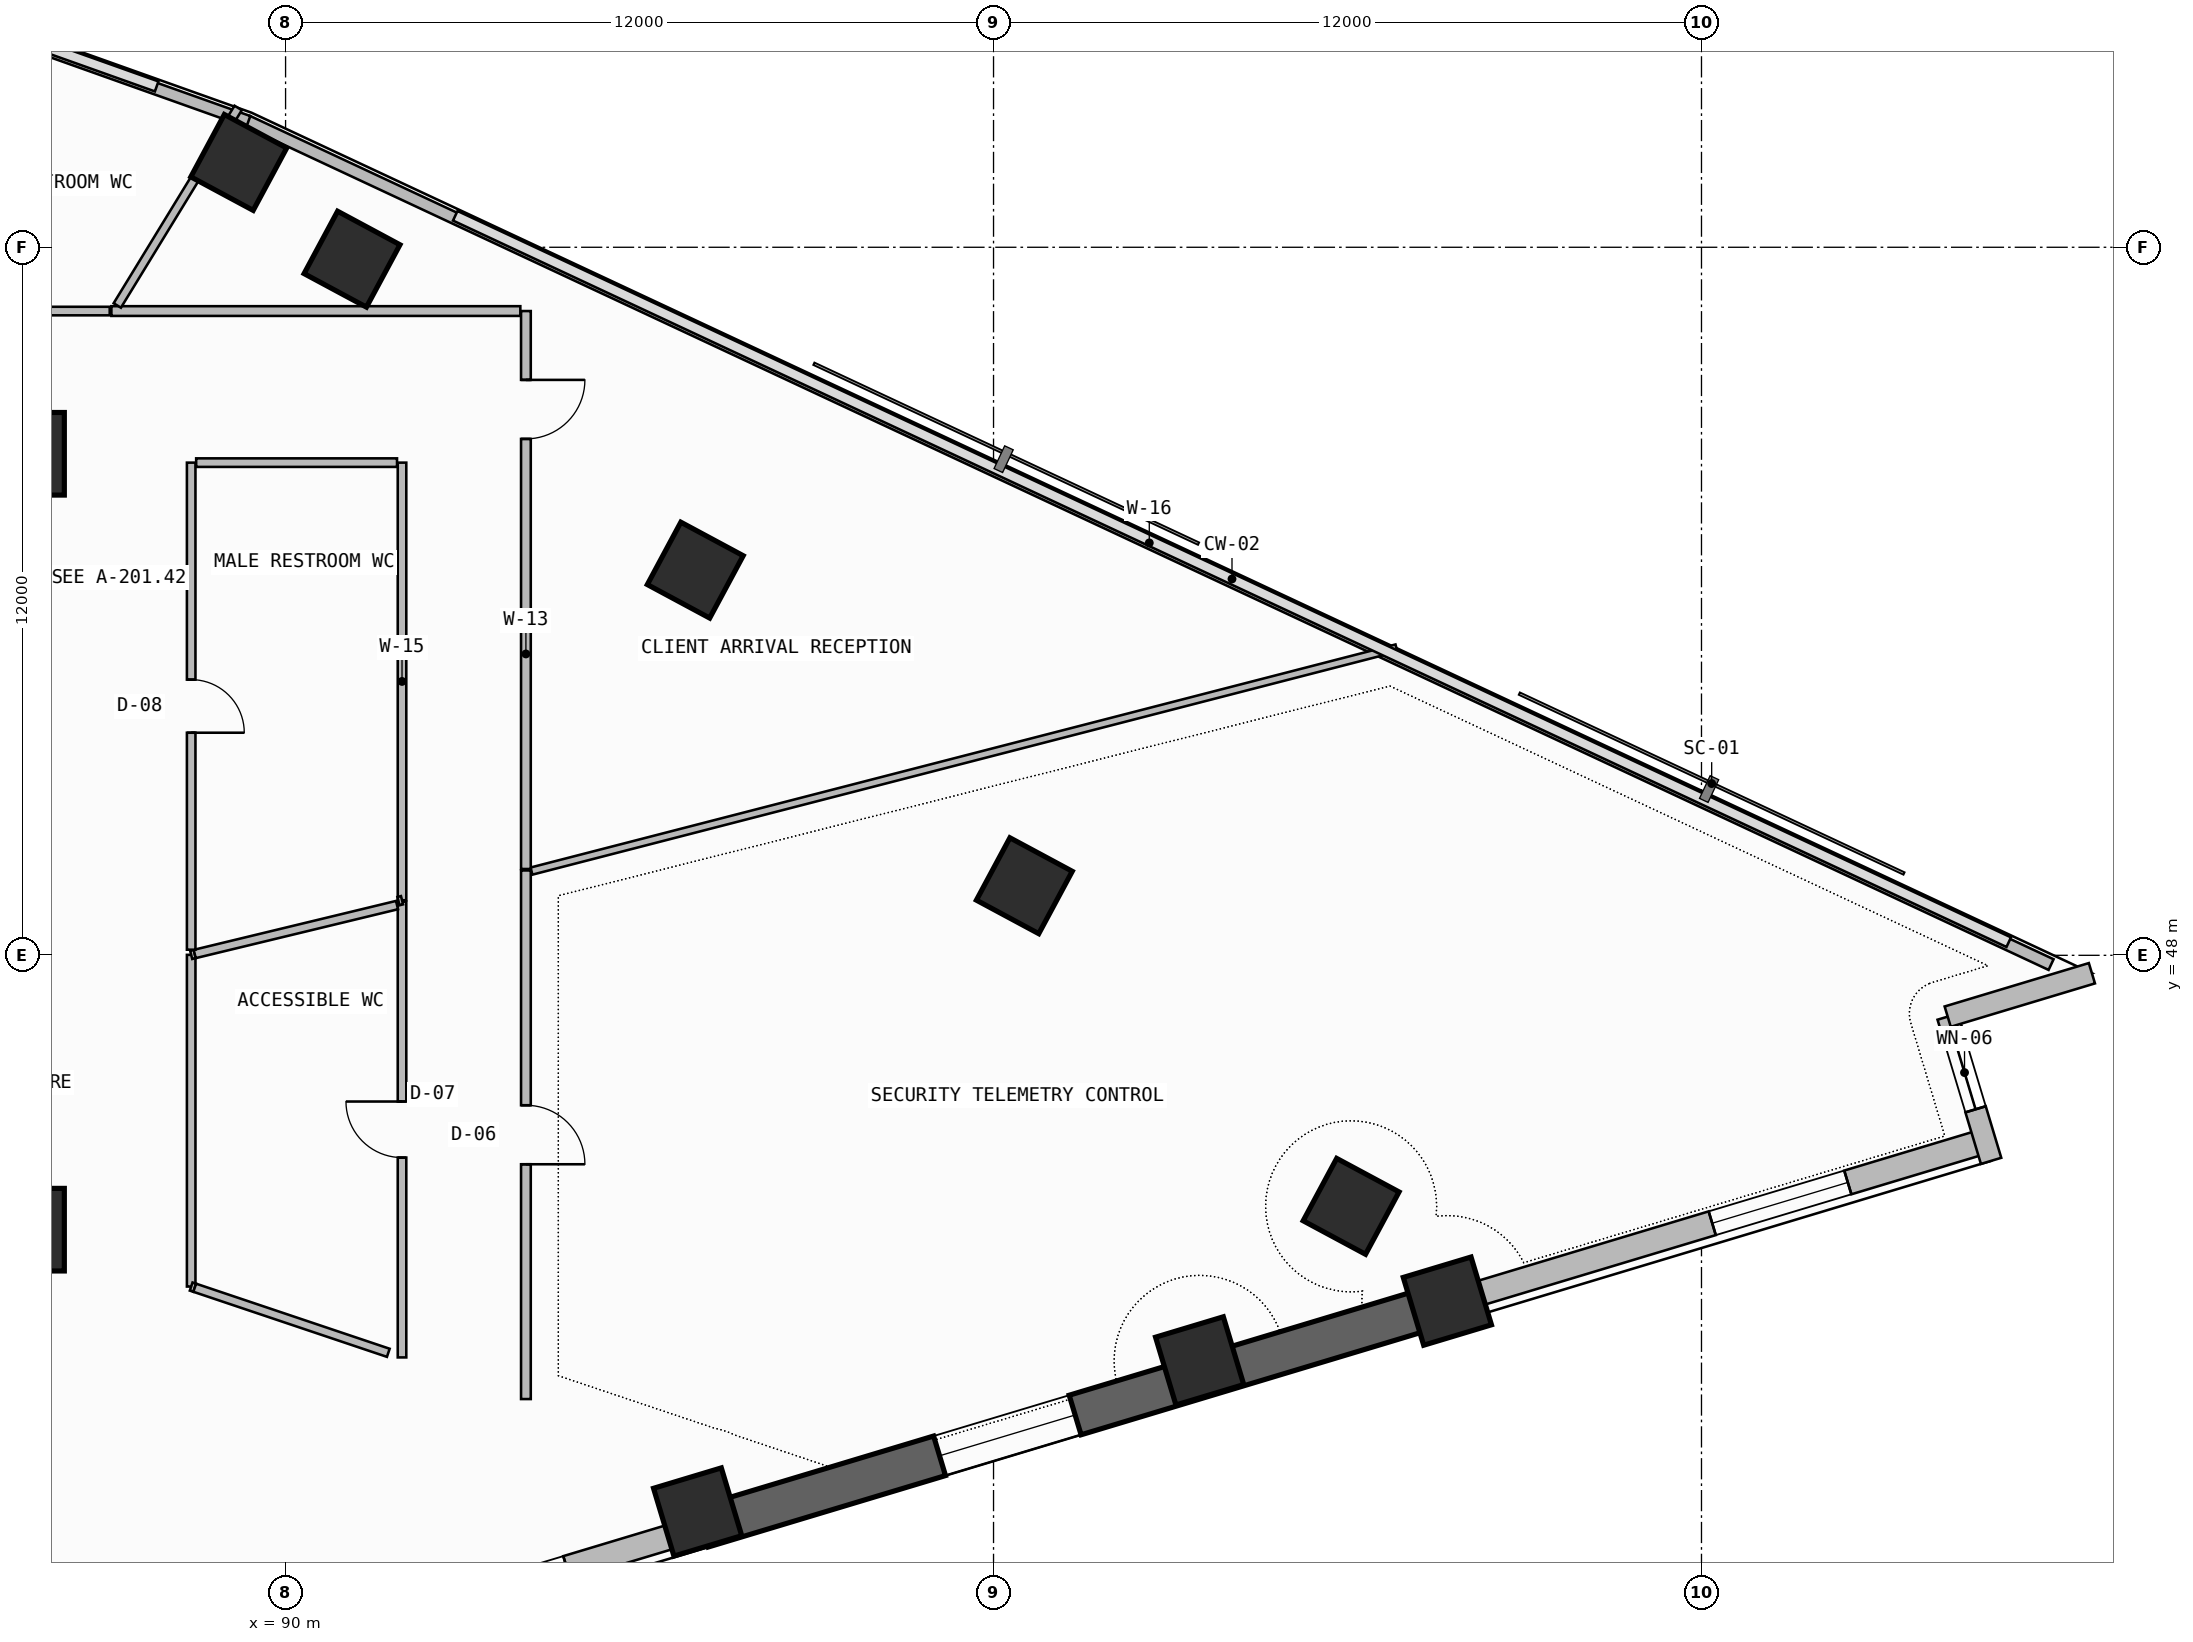
"""IFC4 building model, lengths in metres.
Left out: names, types, materials, properties, quantities, classifications, styles, units other than length and angle.
Written with IfcOpenShell. Run it as: python <this file> out.ifc"""

import sys

from ifc_helpers import new_model, si_unit, direction, frame, frame_2d, origin, origin_2d, place, context, subcontext, project, spatial, rectangle, extrude, element, fill, save


model = new_model("IFC4")
c1 = context("Model", 3, precision=1e-05, world=origin(), true_north=direction((0.0, 1.0)))
c2 = subcontext(c1, "Body", "Model", "MODEL_VIEW")
j1 = project(units=[si_unit("LENGTHUNIT", "METRE"), si_unit("PLANEANGLEUNIT", "RADIAN")], contexts=[c1])
p1 = place(None, origin())
s1 = spatial("IfcSite", under=j1, at=p1, CompositionType="ELEMENT")
p2 = place(p1, origin())
s2 = spatial("IfcBuilding", under=s1, at=p2, CompositionType="ELEMENT")
p3 = place(p2, frame((0.0, 0.0, 150.3)))
s3 = spatial("IfcBuildingStorey", under=s2, at=p3, CompositionType="ELEMENT", Elevation=150.3)
for number, where, z_axis, x_axis in (
    (1, (85.55, 43.35, 0.0), (0.0, 0.0, 1.0), (1.0, 0.0, 0.0)),
    (2, (85.55, 56.5, 0.0), (0.0, 0.0, 1.0), (1.0, 0.0, 0.0)),
):
    element("IfcColumn", number, at=place(p3, frame(where, z_axis=z_axis, x_axis=x_axis)), inside=s3, PredefinedType="COLUMN", context=c2, shape_type="SweptSolid", body=[
        extrude(rectangle(XDim=1.4, YDim=1.4, at=origin_2d()), origin(), (0.0, 0.0, 1.0), 3.6),
    ])
for number, where, z_axis, x_axis in (
    (3, (96.985, 38.565, 0.0), (0.0, 0.0, 1.0), (0.958, 0.288, 0.0)),
    (4, (105.494, 41.126, 0.0), (0.0, 0.0, 1.0), (0.958, 0.288, 0.0)),
    (5, (109.693, 42.139, 0.0), (0.0, 0.0, 1.0), (0.958, 0.288, 0.0)),
    (6, (108.061, 43.746, 0.0), (0.0, 0.0, 1.0), (0.473, 0.881, 0.0)),
    (7, (102.522, 49.179, 0.0), (0.0, 0.0, 1.0), (0.473, 0.881, 0.0)),
    (8, (96.944, 54.528, 0.0), (0.0, 0.0, 1.0), (0.473, 0.881, 0.0)),
    (9, (91.126, 59.798, 0.0), (0.0, 0.0, 1.0), (0.473, 0.881, 0.0)),
    (10, (89.207, 61.438, 0.0), (0.0, 0.0, 1.0), (0.473, 0.881, 0.0)),
):
    element("IfcColumn", number, at=place(p3, frame(where, z_axis=z_axis, x_axis=x_axis)), inside=s3, PredefinedType="COLUMN", context=c2, shape_type="SweptSolid", body=[
        extrude(rectangle(XDim=1.2, YDim=1.2, at=origin_2d()), origin(), (0.0, 0.0, 1.0), 3.6),
    ])
p4 = place(p3, frame((86.1, 35.007, 0.0), z_axis=(0.0, 0.0, 1.0), x_axis=(0.957569401796, 0.288202777129, 0.0)))
e11 = element("IfcWall", 11, at=p4, inside=s3, PredefinedType="SOLIDWALL", context=c2, shape_type="SweptSolid", body=[
    extrude(rectangle(XDim=11.448, YDim=0.42, at=frame_2d((5.724, 0.0))), origin(), (0.0, 0.0, 1.0), 2.325),
])
p5 = place(p4, frame((6.652, 0.0, 1.2)))
e12 = element("IfcOpeningElement", 12, at=p5, cuts=e11, PredefinedType="OPENING", context=c2, shape_type="SweptSolid", body=[
    extrude(rectangle(XDim=2.4, YDim=0.9, at=frame_2d((1.2, 0.45))), frame((0.0, 0.22, 0.0), z_axis=(0.0, -1.0, 0.0), x_axis=(1.0, 0.0, 0.0)), (0.0, 0.0, 1.0), 0.44),
])
p6 = place(p3, frame((97.062, 38.307, -0.26), z_axis=(0.0, 0.0, 1.0), x_axis=(0.957569832102, 0.288201347408, 0.0)))
e13 = element("IfcWall", 13, at=p6, inside=s3, PredefinedType="SHEAR", context=c2, shape_type="SweptSolid", body=[
    extrude(rectangle(XDim=13.199, YDim=0.7, at=frame_2d((6.6, 0.0))), origin(), (0.0, 0.0, 1.0), 3.6),
])
p7 = place(p6, frame((4.201, 0.0, 1.2)))
e14 = element("IfcOpeningElement", 14, at=p7, cuts=e13, PredefinedType="OPENING", context=c2, shape_type="SweptSolid", body=[
    extrude(rectangle(XDim=2.4, YDim=0.9, at=frame_2d((1.2, 0.45))), frame((0.0, 0.36, 0.0), z_axis=(0.0, -1.0, 0.0), x_axis=(1.0, 0.0, 0.0)), (0.0, 0.0, 1.0), 0.72),
])
p8 = place(p3, frame((109.701, 42.111, 0.0), z_axis=(0.0, 0.0, 1.0), x_axis=(0.957575807765, 0.288181492091, 0.0)))
e15 = element("IfcWall", 15, at=p8, inside=s3, PredefinedType="SOLIDWALL", context=c2, shape_type="SweptSolid", body=[
    extrude(rectangle(XDim=9.51, YDim=0.42, at=frame_2d((4.755, 0.0))), origin(), (0.0, 0.0, 1.0), 2.325),
])
p9 = place(p8, frame((4.679, 0.0, 1.2)))
e16 = element("IfcOpeningElement", 16, at=p9, cuts=e15, PredefinedType="OPENING", context=c2, shape_type="SweptSolid", body=[
    extrude(rectangle(XDim=2.4, YDim=0.9, at=frame_2d((1.2, 0.45))), frame((0.0, 0.22, 0.0), z_axis=(0.0, -1.0, 0.0), x_axis=(1.0, 0.0, 0.0)), (0.0, 0.0, 1.0), 0.44),
])
p10 = place(p3, frame((118.909, 44.516, 0.0), z_axis=(0.0, 0.0, 1.0), x_axis=(-0.288172590882, 0.95757848653, 0.0)))
e17 = element("IfcWall", 17, at=p10, inside=s3, PredefinedType="SOLIDWALL", context=c2, shape_type="SweptSolid", body=[
    extrude(rectangle(XDim=2.553, YDim=0.36, at=frame_2d((1.276, 0.0))), origin(), (0.0, 0.0, 1.0), 3.34),
])
p11 = place(p10, frame((0.913, 0.0, 0.45)))
e18 = element("IfcOpeningElement", 18, at=p11, cuts=e17, PredefinedType="OPENING", context=c2, shape_type="SweptSolid", body=[
    extrude(rectangle(XDim=1.3, YDim=2.4, at=frame_2d((0.65, 1.2))), frame((0.0, 0.19, 0.0), z_axis=(0.0, -1.0, 0.0), x_axis=(1.0, 0.0, 0.0)), (0.0, 0.0, 1.0), 0.38),
])
p12 = place(p3, frame((118.173, 46.96, 0.0), z_axis=(0.0, 0.0, 1.0), x_axis=(0.95757848653, 0.288172590882, 0.0)))
e19 = element("IfcWall", 19, at=p12, inside=s3, PredefinedType="SOLIDWALL", context=c2, shape_type="SweptSolid", body=[
    extrude(rectangle(XDim=2.553, YDim=0.36, at=frame_2d((1.276, 0.0))), origin(), (0.0, 0.0, 1.0), 3.34),
])
p13 = place(p3, frame((119.926, 47.843, 0.0), z_axis=(0.0, 0.0, 1.0), x_axis=(-0.905880730846, 0.423532881228, 0.0)))
e20 = element("IfcWall", 20, at=p13, inside=s3, PredefinedType="PARAPET", context=c2, shape_type="SweptSolid", body=[
    extrude(rectangle(XDim=33.748, YDim=0.2, at=frame_2d((16.874, 0.0))), origin(), (0.0, 0.0, 1.0), 1.15),
])
p14 = place(p3, frame((89.368, 62.13, 0.0), z_axis=(0.0, 0.0, 1.0), x_axis=(-0.942033439765, 0.335518998515, 0.0)))
e21 = element("IfcWall", 21, at=p14, inside=s3, PredefinedType="PARAPET", context=c2, shape_type="SweptSolid", body=[
    extrude(rectangle(XDim=27.969, YDim=0.2, at=frame_2d((13.985, 0.0))), origin(), (0.0, 0.0, 1.0), 1.15),
])
p15 = place(p3, frame((91.974, 48.909, 0.0), z_axis=(0.0, 0.0, 1.0), x_axis=(0.0, -1.0, 0.0)))
e22 = element("IfcWall", 22, at=p15, inside=s3, PredefinedType="PARTITIONING", context=c2, shape_type="SweptSolid", body=[
    extrude(rectangle(XDim=7.724, YDim=0.145, at=frame_2d((3.862, 0.0))), origin(), (0.0, 0.0, 1.0), 2.725),
])
p16 = place(p15, frame((3.387, 0.0, 0.0)))
e23 = element("IfcOpeningElement", 23, at=p16, cuts=e22, PredefinedType="OPENING", context=c2, shape_type="SweptSolid", body=[
    extrude(rectangle(XDim=0.95, YDim=2.15, at=frame_2d((0.475, 1.075))), frame((0.0, 0.083, 0.0), z_axis=(0.0, -1.0, 0.0), x_axis=(1.0, 0.0, 0.0)), (0.0, 0.0, 1.0), 0.165),
])
p17 = place(p3, frame((88.4, 42.386, 0.0), z_axis=(0.0, 0.0, 1.0), x_axis=(0.0, 1.0, 0.0)))
e24 = element("IfcWall", 24, at=p17, inside=s3, PredefinedType="PARTITIONING", context=c2, shape_type="SweptSolid", body=[
    extrude(rectangle(XDim=5.622, YDim=0.145, at=frame_2d((2.811, 0.0))), origin(), (0.0, 0.0, 1.0), 2.725),
])
p18 = place(p3, frame((88.46, 42.366, 0.0), z_axis=(0.0, 0.0, 1.0), x_axis=(-0.948683298051, 0.316227766017, 0.0)))
e25 = element("IfcWall", 25, at=p18, inside=s3, PredefinedType="PARTITIONING", context=c2, shape_type="SweptSolid", body=[
    extrude(rectangle(XDim=0.063, YDim=0.145, at=frame_2d((0.032, 0.0))), origin(), (0.0, 0.0, 1.0), 3.34),
])
p19 = place(p3, frame((88.4, 48.008, 0.0), z_axis=(0.0, 0.0, 1.0), x_axis=(0.969676988372, 0.244390135281, 0.0)))
e26 = element("IfcWall", 26, at=p19, inside=s3, PredefinedType="PARTITIONING", context=c2, shape_type="SweptSolid", body=[
    extrude(rectangle(XDim=0.062, YDim=0.145, at=frame_2d((0.031, 0.0))), origin(), (0.0, 0.0, 1.0), 3.34),
])
p20 = place(p3, frame((88.46, 48.022, 0.0), z_axis=(0.0, 0.0, 1.0), x_axis=(0.972005952345, 0.234956227, 0.0)))
e27 = element("IfcWall", 27, at=p20, inside=s3, PredefinedType="PARTITIONING", context=c2, shape_type="SweptSolid", body=[
    extrude(rectangle(XDim=3.528, YDim=0.145, at=frame_2d((1.764, 0.0))), origin(), (0.0, 0.0, 1.0), 2.925),
])
p21 = place(p3, frame((94.074, 40.479, 0.0), z_axis=(0.0, 0.0, 1.0), x_axis=(0.0, 1.0, 0.0)))
e28 = element("IfcWall", 28, at=p21, inside=s3, PredefinedType="PARTITIONING", context=c2, shape_type="SweptSolid", body=[
    extrude(rectangle(XDim=8.959, YDim=0.165, at=frame_2d((4.479, 0.0))), origin(), (0.0, 0.0, 1.0), 2.725),
])
p22 = place(p21, frame((3.979, 0.0, 0.0)))
e29 = element("IfcOpeningElement", 29, at=p22, cuts=e28, PredefinedType="OPENING", context=c2, shape_type="SweptSolid", body=[
    extrude(rectangle(XDim=1.0, YDim=2.2, at=frame_2d((0.5, 1.1))), frame((0.0, 0.093, 0.0), z_axis=(0.0, -1.0, 0.0), x_axis=(1.0, 0.0, 0.0)), (0.0, 0.0, 1.0), 0.185),
])
p23 = place(p3, frame((94.168, 49.427, 0.0), z_axis=(0.0, 0.0, 1.0), x_axis=(0.968327143574, 0.249684887445, 0.0)))
e30 = element("IfcWall", 30, at=p23, inside=s3, PredefinedType="PARTITIONING", context=c2, shape_type="SweptSolid", body=[
    extrude(rectangle(XDim=15.14, YDim=0.125, at=frame_2d((7.57, 0.0))), origin(), (0.0, 0.0, 1.0), 2.725),
])
p24 = place(p3, frame((94.074, 49.463, 0.0), z_axis=(0.0, 0.0, 1.0), x_axis=(0.0, 1.0, 0.0)))
e31 = element("IfcWall", 31, at=p24, inside=s3, PredefinedType="PARTITIONING", context=c2, shape_type="SweptSolid", body=[
    extrude(rectangle(XDim=9.456, YDim=0.165, at=frame_2d((4.728, 0.0))), origin(), (0.0, 0.0, 1.0), 2.725),
])
p25 = place(p24, frame((7.289, 0.0, 0.0)))
e32 = element("IfcOpeningElement", 32, at=p25, cuts=e31, PredefinedType="OPENING", context=c2, shape_type="SweptSolid", body=[
    extrude(rectangle(XDim=1.0, YDim=2.2, at=frame_2d((0.5, 1.1))), frame((0.0, 0.093, 0.0), z_axis=(0.0, -1.0, 0.0), x_axis=(1.0, 0.0, 0.0)), (0.0, 0.0, 1.0), 0.185),
])
p26 = place(p3, frame((93.979, 58.919, 0.0), z_axis=(0.0, 0.0, 1.0), x_axis=(-1.0, 0.0, 0.0)))
e33 = element("IfcWall", 33, at=p26, inside=s3, PredefinedType="PARTITIONING", context=c2, shape_type="SweptSolid", body=[
    extrude(rectangle(XDim=6.932, YDim=0.165, at=frame_2d((3.466, 0.0))), origin(), (0.0, 0.0, 1.0), 2.725),
])
p27 = place(p3, frame((87.147, 59.013, 0.0), z_axis=(0.0, 0.0, 1.0), x_axis=(0.521958116248, 0.85297111609, 0.0)))
e34 = element("IfcWall", 34, at=p27, inside=s3, PredefinedType="PARTITIONING", context=c2, shape_type="SweptSolid", body=[
    extrude(rectangle(XDim=3.925, YDim=0.145, at=frame_2d((1.963, 0.0))), origin(), (0.0, 0.0, 1.0), 2.725),
])
p28 = place(p3, frame((88.4, 48.095, 0.0), z_axis=(0.0, 0.0, 1.0), x_axis=(0.0, 1.0, 0.0)))
e35 = element("IfcWall", 35, at=p28, inside=s3, PredefinedType="PARTITIONING", context=c2, shape_type="SweptSolid", body=[
    extrude(rectangle(XDim=8.255, YDim=0.145, at=frame_2d((4.127, 0.0))), origin(), (0.0, 0.0, 1.0), 2.725),
])
p29 = place(p28, frame((3.677, 0.0, 0.0)))
e36 = element("IfcOpeningElement", 36, at=p29, cuts=e35, PredefinedType="OPENING", context=c2, shape_type="SweptSolid", body=[
    extrude(rectangle(XDim=0.9, YDim=2.1, at=frame_2d((0.45, 1.05))), frame((0.0, 0.083, 0.0), z_axis=(0.0, -1.0, 0.0), x_axis=(1.0, 0.0, 0.0)), (0.0, 0.0, 1.0), 0.165),
])
p30 = place(p3, frame((91.974, 56.35, 0.0), z_axis=(0.0, 0.0, 1.0), x_axis=(0.0, -1.0, 0.0)))
e37 = element("IfcWall", 37, at=p30, inside=s3, PredefinedType="PARTITIONING", context=c2, shape_type="SweptSolid", body=[
    extrude(rectangle(XDim=7.417, YDim=0.145, at=frame_2d((3.708, 0.0))), origin(), (0.0, 0.0, 1.0), 2.725),
])
p31 = place(p3, frame((88.485, 56.35, 0.0), z_axis=(0.0, 0.0, 1.0), x_axis=(1.0, 0.0, 0.0)))
e38 = element("IfcWall", 38, at=p31, inside=s3, PredefinedType="PARTITIONING", context=c2, shape_type="SweptSolid", body=[
    extrude(rectangle(XDim=3.405, YDim=0.145, at=frame_2d((1.702, 0.0))), origin(), (0.0, 0.0, 1.0), 2.925),
])
p32 = place(p3, frame((91.974, 48.934, 0.0), z_axis=(0.0, 0.0, 1.0), x_axis=(-0.969440203112, -0.245327724869, 0.0)))
e39 = element("IfcWall", 39, at=p32, inside=s3, PredefinedType="PARTITIONING", context=c2, shape_type="SweptSolid", body=[
    extrude(rectangle(XDim=0.062, YDim=0.145, at=frame_2d((0.031, 0.0))), origin(), (0.0, 0.0, 1.0), 3.34),
])
p33 = place(p3, frame((87.019, 58.919, 0.0), z_axis=(0.0, 0.0, 1.0), x_axis=(-1.0, 0.0, 0.0)))
e40 = element("IfcWall", 40, at=p33, inside=s3, PredefinedType="PARTITIONING", context=c2, shape_type="SweptSolid", body=[
    extrude(rectangle(XDim=6.667, YDim=0.145, at=frame_2d((3.333, 0.0))), origin(), (0.0, 0.0, 1.0), 2.725),
])
p34 = place(p33, frame((3.689, 0.0, 0.0)))
e41 = element("IfcOpeningElement", 41, at=p34, cuts=e40, PredefinedType="OPENING", context=c2, shape_type="SweptSolid", body=[
    extrude(rectangle(XDim=0.9, YDim=2.1, at=frame_2d((0.45, 1.05))), frame((0.0, 0.083, 0.0), z_axis=(0.0, -1.0, 0.0), x_axis=(1.0, 0.0, 0.0)), (0.0, 0.0, 1.0), 0.165),
])
p35 = place(p3, frame((91.741, 41.263, 0.0), z_axis=(0.0, 0.0, 1.0), x_axis=(-0.947897529137, 0.318575382375, 0.0)))
e42 = element("IfcWall", 42, at=p35, inside=s3, PredefinedType="PARTITIONING", context=c2, shape_type="SweptSolid", body=[
    extrude(rectangle(XDim=3.462, YDim=0.145, at=frame_2d((1.731, 0.0))), origin(), (0.0, 0.0, 1.0), 3.34),
])
p36 = place(p7, origin())
e43 = element("IfcWindow", 43, at=p36, inside=s3, PartitioningType="SINGLE_PANEL", PredefinedType="WINDOW", context=c2, shape_type="SweptSolid", body=[
    extrude(rectangle(XDim=2.4, YDim=0.9, at=frame_2d((1.2, 0.45))), frame((0.0, 0.03, 0.0), z_axis=(0.0, -1.0, 0.0), x_axis=(1.0, 0.0, 0.0)), (0.0, 0.0, 1.0), 0.06),
])
fill(e14, e43)
p37 = place(p9, origin())
e44 = element("IfcWindow", 44, at=p37, inside=s3, PartitioningType="SINGLE_PANEL", PredefinedType="WINDOW", context=c2, shape_type="SweptSolid", body=[
    extrude(rectangle(XDim=2.4, YDim=0.9, at=frame_2d((1.2, 0.45))), frame((0.0, 0.03, 0.0), z_axis=(0.0, -1.0, 0.0), x_axis=(1.0, 0.0, 0.0)), (0.0, 0.0, 1.0), 0.06),
])
fill(e16, e44)
p38 = place(p11, origin())
e45 = element("IfcWindow", 45, at=p38, inside=s3, PartitioningType="SINGLE_PANEL", PredefinedType="WINDOW", context=c2, shape_type="SweptSolid", body=[
    extrude(rectangle(XDim=1.3, YDim=2.4, at=frame_2d((0.65, 1.2))), frame((0.0, 0.03, 0.0), z_axis=(0.0, -1.0, 0.0), x_axis=(1.0, 0.0, 0.0)), (0.0, 0.0, 1.0), 0.06),
])
fill(e18, e45)
p39 = place(p16, frame((0.95, 0.0, 0.0), z_axis=(0.0, 0.0, 1.0), x_axis=(-1.0, 0.0, 0.0)))
e46 = element("IfcDoor", 46, at=p39, inside=s3, OperationType="SINGLE_SWING_RIGHT", PredefinedType="DOOR", context=c2, shape_type="SweptSolid", body=[
    extrude(rectangle(XDim=0.95, YDim=2.15, at=frame_2d((0.475, 1.075))), frame((0.0, 0.025, 0.0), z_axis=(0.0, -1.0, 0.0), x_axis=(1.0, 0.0, 0.0)), (0.0, 0.0, 1.0), 0.05),
])
fill(e23, e46)
p40 = place(p22, frame((1.0, 0.0, 0.0), z_axis=(0.0, 0.0, 1.0), x_axis=(-1.0, 0.0, 0.0)))
e47 = element("IfcDoor", 47, at=p40, inside=s3, OperationType="SINGLE_SWING_RIGHT", PredefinedType="DOOR", context=c2, shape_type="SweptSolid", body=[
    extrude(rectangle(XDim=1.0, YDim=2.2, at=frame_2d((0.5, 1.1))), frame((0.0, 0.025, 0.0), z_axis=(0.0, -1.0, 0.0), x_axis=(1.0, 0.0, 0.0)), (0.0, 0.0, 1.0), 0.05),
])
fill(e29, e47)
p41 = place(p25, frame((1.0, 0.0, 0.0), z_axis=(0.0, 0.0, 1.0), x_axis=(-1.0, 0.0, 0.0)))
e48 = element("IfcDoor", 48, at=p41, inside=s3, OperationType="SINGLE_SWING_LEFT", PredefinedType="DOOR", context=c2, shape_type="SweptSolid", body=[
    extrude(rectangle(XDim=1.0, YDim=2.2, at=frame_2d((0.5, 1.1))), frame((0.0, 0.025, 0.0), z_axis=(0.0, -1.0, 0.0), x_axis=(1.0, 0.0, 0.0)), (0.0, 0.0, 1.0), 0.05),
])
fill(e32, e48)
p42 = place(p29, frame((0.9, 0.0, 0.0), z_axis=(0.0, 0.0, 1.0), x_axis=(-1.0, 0.0, 0.0)))
e49 = element("IfcDoor", 49, at=p42, inside=s3, OperationType="SINGLE_SWING_RIGHT", PredefinedType="DOOR", context=c2, shape_type="SweptSolid", body=[
    extrude(rectangle(XDim=0.9, YDim=2.1, at=frame_2d((0.45, 1.05))), frame((0.0, 0.025, 0.0), z_axis=(0.0, -1.0, 0.0), x_axis=(1.0, 0.0, 0.0)), (0.0, 0.0, 1.0), 0.05),
])
fill(e36, e49)
save(model, sys.argv[1])
